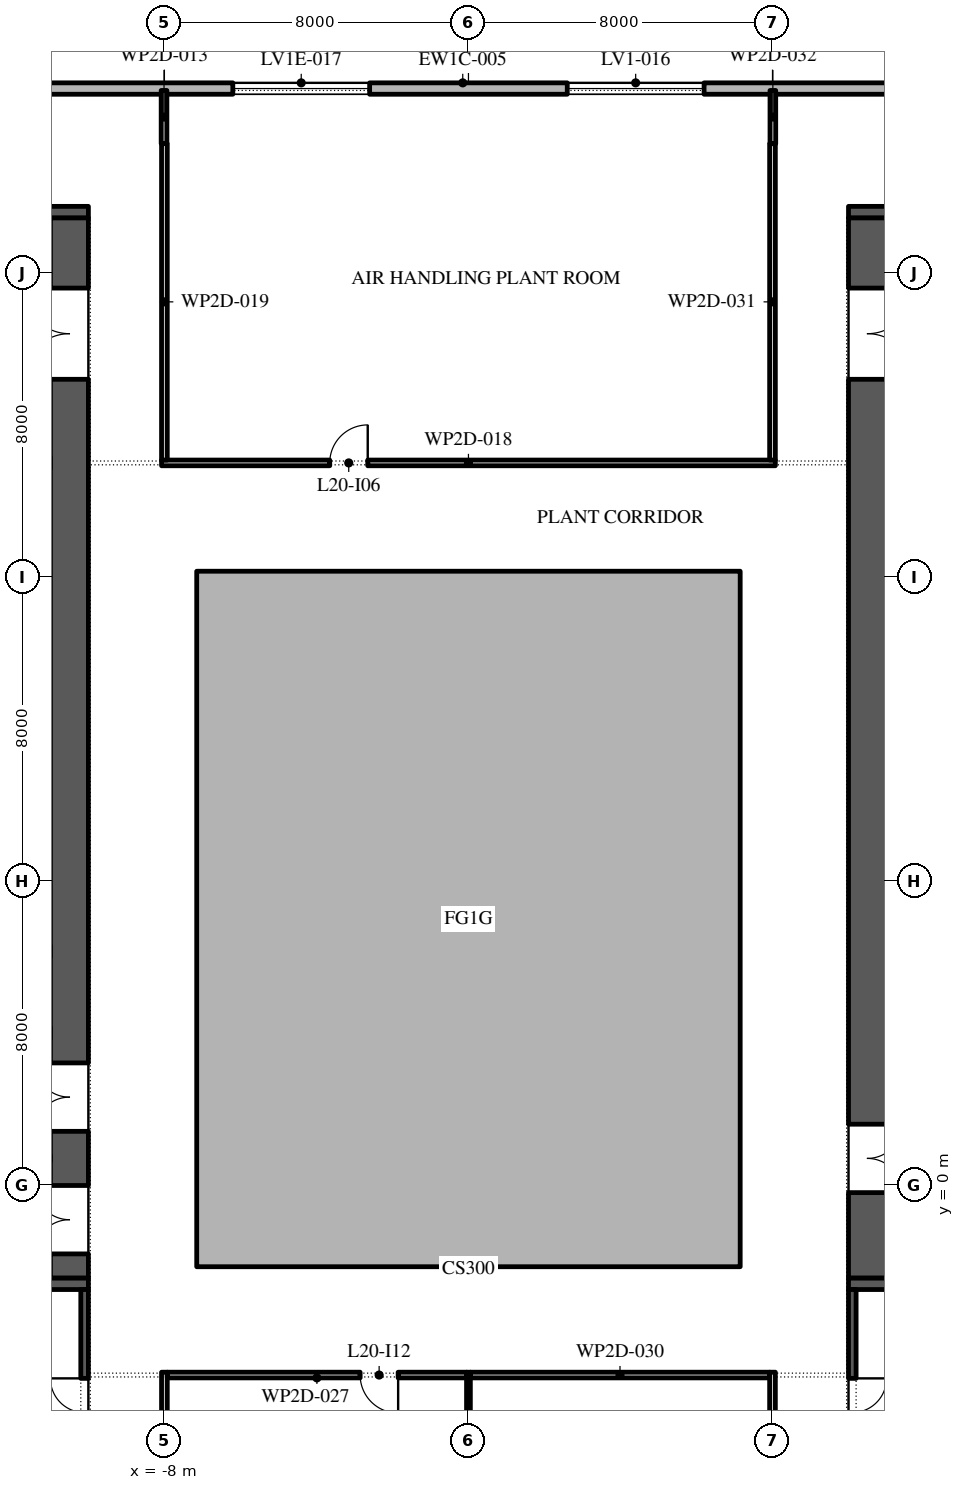
"""IFC4 building model, lengths in metres.
Left out: names, types, materials, properties, quantities, classifications, styles, units other than length and angle.
Written with IfcOpenShell. Run it as: python <this file> out.ifc"""

import sys

from ifc_helpers import new_model, si_unit, direction, frame, frame_2d, origin, place, context, subcontext, project, spatial, polyline, rectangle, outline, extrude, element, fill, save


model = new_model("IFC4")
c1 = context("Model", 3, precision=1e-05, world=origin(), true_north=direction((0.0, 1.0)))
c2 = subcontext(c1, "Body", "Model", "MODEL_VIEW")
j1 = project(units=[si_unit("LENGTHUNIT", "METRE"), si_unit("PLANEANGLEUNIT", "RADIAN")], contexts=[c1])
p1 = place(None, origin())
s1 = spatial("IfcSite", under=j1, at=p1, CompositionType="ELEMENT")
p2 = place(p1, origin())
s2 = spatial("IfcBuilding", under=s1, at=p2, CompositionType="ELEMENT")
p3 = place(p2, frame((0.0, 0.0, 94.2)))
s3 = spatial("IfcBuildingStorey", under=s2, at=p3, CompositionType="ELEMENT", Elevation=94.2)
p4 = place(p3, origin())
e1 = element("IfcWall", 1, at=p4, inside=s3, PredefinedType="STANDARD", context=c2, shape_type="SweptSolid", body=[
    extrude(outline(polyline([(-7.15, -2.15), (7.15, -2.15), (7.15, 16.15), (-7.15, 16.15), (-7.15, -2.15)]), holes=[polyline([(-7.0, -2.0), (-7.0, 16.0), (7.0, 16.0), (7.0, -2.0), (-7.0, -2.0)])]), origin(), (0.0, 0.0, 1.0), 4.95),
])
p5 = place(p3, frame((26.1, 28.85, 0.0), z_axis=(0.0, 0.0, 1.0), x_axis=(-1.0, 0.0, 0.0)))
e2 = element("IfcWall", 2, at=p5, inside=s3, PredefinedType="STANDARD", context=c2, shape_type="SweptSolid", body=[
    extrude(rectangle(XDim=52.5, YDim=0.3, at=frame_2d((26.25, 0.0))), origin(), (0.0, 0.0, 1.0), 4.95),
])
p6 = place(p5, frame((2.45, 0.0, 0.6)))
e3 = element("IfcOpeningElement", 3, at=p6, cuts=e2, PredefinedType="OPENING", context=c2, shape_type="SweptSolid", body=[
    extrude(rectangle(XDim=3.6, YDim=3.9, at=frame_2d((1.8, 1.95))), frame((0.0, 0.16, 0.0), z_axis=(0.0, -1.0, 0.0), x_axis=(1.0, 0.0, 0.0)), (0.0, 0.0, 1.0), 0.32),
])
p7 = place(p5, frame((11.1, 0.0, 0.6)))
e4 = element("IfcOpeningElement", 4, at=p7, cuts=e2, PredefinedType="OPENING", context=c2, shape_type="SweptSolid", body=[
    extrude(rectangle(XDim=3.6, YDim=3.75, at=frame_2d((1.8, 1.875))), frame((0.0, 0.16, 0.0), z_axis=(0.0, -1.0, 0.0), x_axis=(1.0, 0.0, 0.0)), (0.0, 0.0, 1.0), 0.32),
])
p8 = place(p5, frame((19.9, 0.0, 0.6)))
e5 = element("IfcOpeningElement", 5, at=p8, cuts=e2, PredefinedType="OPENING", context=c2, shape_type="SweptSolid", body=[
    extrude(rectangle(XDim=3.6, YDim=3.9, at=frame_2d((1.8, 1.95))), frame((0.0, 0.16, 0.0), z_axis=(0.0, -1.0, 0.0), x_axis=(1.0, 0.0, 0.0)), (0.0, 0.0, 1.0), 0.32),
])
p9 = place(p5, frame((28.7, 0.0, 0.6)))
e6 = element("IfcOpeningElement", 6, at=p9, cuts=e2, PredefinedType="OPENING", context=c2, shape_type="SweptSolid", body=[
    extrude(rectangle(XDim=3.6, YDim=3.55, at=frame_2d((1.8, 1.775))), frame((0.0, 0.16, 0.0), z_axis=(0.0, -1.0, 0.0), x_axis=(1.0, 0.0, 0.0)), (0.0, 0.0, 1.0), 0.32),
])
p10 = place(p5, frame((37.5, 0.0, 0.6)))
e7 = element("IfcOpeningElement", 7, at=p10, cuts=e2, PredefinedType="OPENING", context=c2, shape_type="SweptSolid", body=[
    extrude(rectangle(XDim=3.6, YDim=3.475, at=frame_2d((1.8, 1.738))), frame((0.0, 0.16, 0.0), z_axis=(0.0, -1.0, 0.0), x_axis=(1.0, 0.0, 0.0)), (0.0, 0.0, 1.0), 0.32),
])
p11 = place(p5, frame((46.3, 0.0, 0.6)))
e8 = element("IfcOpeningElement", 8, at=p11, cuts=e2, PredefinedType="OPENING", context=c2, shape_type="SweptSolid", body=[
    extrude(rectangle(XDim=3.6, YDim=3.9, at=frame_2d((1.8, 1.95))), frame((0.0, 0.16, 0.0), z_axis=(0.0, -1.0, 0.0), x_axis=(1.0, 0.0, 0.0)), (0.0, 0.0, 1.0), 0.32),
])
p12 = place(p3, frame((-10.5, -2.45, 0.0), z_axis=(0.0, 0.0, 1.0), x_axis=(0.0, 1.0, 0.0)))
e9 = element("IfcWall", 9, at=p12, inside=s3, PredefinedType="SHEAR", context=c2, shape_type="SweptSolid", body=[
    extrude(rectangle(XDim=27.9, YDim=1.0, at=frame_2d((13.95, 0.0))), origin(), (0.0, 0.0, 1.0), 4.95),
])
p13 = place(p12, frame((23.65, 0.0, 0.0)))
e10 = element("IfcOpeningElement", 10, at=p13, cuts=e9, PredefinedType="OPENING", context=c2, shape_type="SweptSolid", body=[
    extrude(rectangle(XDim=2.4, YDim=2.1, at=frame_2d((1.2, 1.05))), frame((0.0, 0.51, 0.0), z_axis=(0.0, -1.0, 0.0), x_axis=(1.0, 0.0, 0.0)), (0.0, 0.0, 1.0), 1.02),
])
p14 = place(p12, frame((0.637, 0.0, 0.0)))
e11 = element("IfcOpeningElement", 11, at=p14, cuts=e9, PredefinedType="OPENING", context=c2, shape_type="SweptSolid", body=[
    extrude(rectangle(XDim=1.8, YDim=2.4, at=frame_2d((0.9, 1.2))), frame((0.0, 0.51, 0.0), z_axis=(0.0, -1.0, 0.0), x_axis=(1.0, 0.0, 0.0)), (0.0, 0.0, 1.0), 1.02),
])
p15 = place(p12, frame((3.863, 0.0, 0.0)))
e12 = element("IfcOpeningElement", 12, at=p15, cuts=e9, PredefinedType="OPENING", context=c2, shape_type="SweptSolid", body=[
    extrude(rectangle(XDim=1.8, YDim=2.4, at=frame_2d((0.9, 1.2))), frame((0.0, 0.51, 0.0), z_axis=(0.0, -1.0, 0.0), x_axis=(1.0, 0.0, 0.0)), (0.0, 0.0, 1.0), 1.02),
])
for number, where, z_axis, x_axis in (
    (13, (-22.0, -2.6, 0.0), (0.0, 0.0, 1.0), (1.0, 0.0, 0.0)),
    (14, (-22.0, 25.6, 0.0), (0.0, 0.0, 1.0), (1.0, 0.0, 0.0)),
):
    element("IfcWall", number, at=place(p3, frame(where, z_axis=z_axis, x_axis=x_axis)), inside=s3, PredefinedType="SHEAR", context=c2, shape_type="SweptSolid", body=[
        extrude(rectangle(XDim=12.0, YDim=0.3, at=frame_2d((6.0, 0.0))), origin(), (0.0, 0.0, 1.0), 4.95),
    ])
p16 = place(p3, frame((-10.1, -15.8, 0.0), z_axis=(0.0, 0.0, 1.0), x_axis=(0.0, 1.0, 0.0)))
e15 = element("IfcWall", 15, at=p16, inside=s3, PredefinedType="SHEAR", context=c2, shape_type="SweptSolid", body=[
    extrude(rectangle(XDim=13.05, YDim=0.2, at=frame_2d((6.525, 0.0))), origin(), (0.0, 0.0, 1.0), 4.95),
])
p17 = place(p16, frame((2.312, 0.0, 0.0)))
e16 = element("IfcOpeningElement", 16, at=p17, cuts=e15, PredefinedType="OPENING", context=c2, shape_type="SweptSolid", body=[
    extrude(rectangle(XDim=1.8, YDim=2.4, at=frame_2d((0.9, 1.2))), frame((0.0, 0.11, 0.0), z_axis=(0.0, -1.0, 0.0), x_axis=(1.0, 0.0, 0.0)), (0.0, 0.0, 1.0), 0.22),
])
p18 = place(p16, frame((8.913, 0.0, 0.0)))
e17 = element("IfcOpeningElement", 17, at=p18, cuts=e15, PredefinedType="OPENING", context=c2, shape_type="SweptSolid", body=[
    extrude(rectangle(XDim=1.8, YDim=2.4, at=frame_2d((0.9, 1.2))), frame((0.0, 0.11, 0.0), z_axis=(0.0, -1.0, 0.0), x_axis=(1.0, 0.0, 0.0)), (0.0, 0.0, 1.0), 0.22),
])
p19 = place(p3, frame((10.5, -2.45, 0.0), z_axis=(0.0, 0.0, 1.0), x_axis=(0.0, 1.0, 0.0)))
e18 = element("IfcWall", 18, at=p19, inside=s3, PredefinedType="SHEAR", context=c2, shape_type="SweptSolid", body=[
    extrude(rectangle(XDim=27.9, YDim=1.0, at=frame_2d((13.95, 0.0))), origin(), (0.0, 0.0, 1.0), 4.95),
])
p20 = place(p19, frame((23.65, 0.0, 0.0)))
e19 = element("IfcOpeningElement", 19, at=p20, cuts=e18, PredefinedType="OPENING", context=c2, shape_type="SweptSolid", body=[
    extrude(rectangle(XDim=2.4, YDim=2.1, at=frame_2d((1.2, 1.05))), frame((0.0, 0.51, 0.0), z_axis=(0.0, -1.0, 0.0), x_axis=(1.0, 0.0, 0.0)), (0.0, 0.0, 1.0), 1.02),
])
p21 = place(p19, frame((2.25, 0.0, 0.0)))
e20 = element("IfcOpeningElement", 20, at=p21, cuts=e18, PredefinedType="OPENING", context=c2, shape_type="SweptSolid", body=[
    extrude(rectangle(XDim=1.8, YDim=2.4, at=frame_2d((0.9, 1.2))), frame((0.0, 0.51, 0.0), z_axis=(0.0, -1.0, 0.0), x_axis=(1.0, 0.0, 0.0)), (0.0, 0.0, 1.0), 1.02),
])
for number, where, z_axis, x_axis in (
    (21, (10.0, -2.6, 0.0), (0.0, 0.0, 1.0), (1.0, 0.0, 0.0)),
    (22, (10.0, 25.6, 0.0), (0.0, 0.0, 1.0), (1.0, 0.0, 0.0)),
):
    element("IfcWall", number, at=place(p3, frame(where, z_axis=z_axis, x_axis=x_axis)), inside=s3, PredefinedType="SHEAR", context=c2, shape_type="SweptSolid", body=[
        extrude(rectangle(XDim=12.0, YDim=0.3, at=frame_2d((6.0, 0.0))), origin(), (0.0, 0.0, 1.0), 4.95),
    ])
p22 = place(p3, frame((10.1, -15.8, 0.0), z_axis=(0.0, 0.0, 1.0), x_axis=(0.0, 1.0, 0.0)))
e23 = element("IfcWall", 23, at=p22, inside=s3, PredefinedType="SHEAR", context=c2, shape_type="SweptSolid", body=[
    extrude(rectangle(XDim=13.05, YDim=0.2, at=frame_2d((6.525, 0.0))), origin(), (0.0, 0.0, 1.0), 4.95),
])
p23 = place(p22, frame((2.312, 0.0, 0.0)))
e24 = element("IfcOpeningElement", 24, at=p23, cuts=e23, PredefinedType="OPENING", context=c2, shape_type="SweptSolid", body=[
    extrude(rectangle(XDim=1.8, YDim=2.4, at=frame_2d((0.9, 1.2))), frame((0.0, 0.11, 0.0), z_axis=(0.0, -1.0, 0.0), x_axis=(1.0, 0.0, 0.0)), (0.0, 0.0, 1.0), 0.22),
])
p24 = place(p22, frame((8.913, 0.0, 0.0)))
e25 = element("IfcOpeningElement", 25, at=p24, cuts=e23, PredefinedType="OPENING", context=c2, shape_type="SweptSolid", body=[
    extrude(rectangle(XDim=1.8, YDim=2.4, at=frame_2d((0.9, 1.2))), frame((0.0, 0.11, 0.0), z_axis=(0.0, -1.0, 0.0), x_axis=(1.0, 0.0, 0.0)), (0.0, 0.0, 1.0), 0.22),
])
p25 = place(p3, frame((-8.01, 28.8, 0.0), z_axis=(0.0, 0.0, 1.0), x_axis=(0.0, -1.0, 0.0)))
e26 = element("IfcWall", 26, at=p25, inside=s3, PredefinedType="PARTITIONING", context=c2, shape_type="SweptSolid", body=[
    extrude(rectangle(XDim=1.4, YDim=0.15, at=frame_2d((0.7, 0.0))), origin(), (0.0, 0.0, 1.0), 4.95),
])
p26 = place(p3, frame((-8.0, -4.925, 0.0), z_axis=(0.0, 0.0, 1.0), x_axis=(0.0, -1.0, 0.0)))
e27 = element("IfcWall", 27, at=p26, inside=s3, PredefinedType="PARTITIONING", context=c2, shape_type="SweptSolid", body=[
    extrude(rectangle(XDim=5.195, YDim=0.15, at=frame_2d((2.598, 0.0))), origin(), (0.0, 0.0, 1.0), 4.95),
])
p27 = place(p3, frame((-8.075, 19.0, 0.0), z_axis=(0.0, 0.0, 1.0), x_axis=(1.0, 0.0, 0.0)))
e28 = element("IfcWall", 28, at=p27, inside=s3, PredefinedType="PARTITIONING", context=c2, shape_type="SweptSolid", body=[
    extrude(rectangle(XDim=16.15, YDim=0.15, at=frame_2d((8.075, 0.0))), origin(), (0.0, 0.0, 1.0), 4.95),
])
p28 = place(p27, frame((4.425, 0.0, 0.0)))
e29 = element("IfcOpeningElement", 29, at=p28, cuts=e28, PredefinedType="OPENING", context=c2, shape_type="SweptSolid", body=[
    extrude(rectangle(XDim=1.0, YDim=2.1, at=frame_2d((0.5, 1.05))), frame((0.0, 0.085, 0.0), z_axis=(0.0, -1.0, 0.0), x_axis=(1.0, 0.0, 0.0)), (0.0, 0.0, 1.0), 0.17),
])
p29 = place(p3, frame((-8.0, 27.4, 0.0), z_axis=(0.0, 0.0, 1.0), x_axis=(0.0, -1.0, 0.0)))
e30 = element("IfcWall", 30, at=p29, inside=s3, PredefinedType="PARTITIONING", context=c2, shape_type="SweptSolid", body=[
    extrude(rectangle(XDim=8.325, YDim=0.15, at=frame_2d((4.163, 0.0))), origin(), (0.0, 0.0, 1.0), 4.95),
])
p30 = place(p3, frame((0.0, -10.12, 0.0), z_axis=(0.0, 0.0, 1.0), x_axis=(0.0, 1.0, 0.0)))
e31 = element("IfcWall", 31, at=p30, inside=s3, PredefinedType="PARTITIONING", context=c2, shape_type="SweptSolid", body=[
    extrude(rectangle(XDim=5.195, YDim=0.1, at=frame_2d((2.598, 0.0))), origin(), (0.0, 0.0, 1.0), 3.97),
])
p31 = place(p3, frame((-0.05, -5.0, 0.0), z_axis=(0.0, 0.0, 1.0), x_axis=(-1.0, 0.0, 0.0)))
e32 = element("IfcWall", 32, at=p31, inside=s3, PredefinedType="PARTITIONING", context=c2, shape_type="SweptSolid", body=[
    extrude(rectangle(XDim=7.875, YDim=0.15, at=frame_2d((3.938, 0.0))), origin(), (0.0, 0.0, 1.0), 4.95),
])
p32 = place(p31, frame((1.8, 0.0, 0.0)))
e33 = element("IfcOpeningElement", 33, at=p32, cuts=e32, PredefinedType="OPENING", context=c2, shape_type="SweptSolid", body=[
    extrude(rectangle(XDim=1.0, YDim=2.1, at=frame_2d((0.5, 1.05))), frame((0.0, 0.085, 0.0), z_axis=(0.0, -1.0, 0.0), x_axis=(1.0, 0.0, 0.0)), (0.0, 0.0, 1.0), 0.17),
])
p33 = place(p3, frame((8.0, -16.45, 0.0), z_axis=(0.0, 0.0, 1.0), x_axis=(0.0, 1.0, 0.0)))
e34 = element("IfcWall", 34, at=p33, inside=s3, PredefinedType="PARTITIONING", context=c2, shape_type="SweptSolid", body=[
    extrude(rectangle(XDim=11.525, YDim=0.15, at=frame_2d((5.762, 0.0))), origin(), (0.0, 0.0, 1.0), 4.95),
])
p34 = place(p33, frame((2.8, 0.0, 0.0)))
e35 = element("IfcOpeningElement", 35, at=p34, cuts=e34, PredefinedType="OPENING", context=c2, shape_type="SweptSolid", body=[
    extrude(rectangle(XDim=1.0, YDim=2.1, at=frame_2d((0.5, 1.05))), frame((0.0, 0.085, 0.0), z_axis=(0.0, -1.0, 0.0), x_axis=(1.0, 0.0, 0.0)), (0.0, 0.0, 1.0), 0.17),
])
p35 = place(p3, frame((7.925, -5.0, 0.0), z_axis=(0.0, 0.0, 1.0), x_axis=(-1.0, 0.0, 0.0)))
e36 = element("IfcWall", 36, at=p35, inside=s3, PredefinedType="PARTITIONING", context=c2, shape_type="SweptSolid", body=[
    extrude(rectangle(XDim=7.875, YDim=0.15, at=frame_2d((3.938, 0.0))), origin(), (0.0, 0.0, 1.0), 4.95),
])
p36 = place(p3, frame((8.0, 19.075, 0.0), z_axis=(0.0, 0.0, 1.0), x_axis=(0.0, 1.0, 0.0)))
e37 = element("IfcWall", 37, at=p36, inside=s3, PredefinedType="PARTITIONING", context=c2, shape_type="SweptSolid", body=[
    extrude(rectangle(XDim=8.325, YDim=0.15, at=frame_2d((4.163, 0.0))), origin(), (0.0, 0.0, 1.0), 4.95),
])
p37 = place(p3, frame((8.01, 27.4, 0.0), z_axis=(0.0, 0.0, 1.0), x_axis=(0.0, 1.0, 0.0)))
e38 = element("IfcWall", 38, at=p37, inside=s3, PredefinedType="PARTITIONING", context=c2, shape_type="SweptSolid", body=[
    extrude(rectangle(XDim=1.4, YDim=0.15, at=frame_2d((0.7, 0.0))), origin(), (0.0, 0.0, 1.0), 4.95),
])
p38 = place(p8, origin())
e39 = element("IfcWindow", 39, at=p38, inside=s3, PartitioningType="DOUBLE_PANEL_HORIZONTAL", PredefinedType="WINDOW", context=c2, shape_type="SweptSolid", body=[
    extrude(rectangle(XDim=3.6, YDim=3.9, at=frame_2d((1.8, 1.95))), frame((0.0, 0.03, 0.0), z_axis=(0.0, -1.0, 0.0), x_axis=(1.0, 0.0, 0.0)), (0.0, 0.0, 1.0), 0.06),
])
fill(e5, e39)
p39 = place(p9, origin())
e40 = element("IfcWindow", 40, at=p39, inside=s3, PartitioningType="DOUBLE_PANEL_HORIZONTAL", PredefinedType="WINDOW", context=c2, shape_type="SweptSolid", body=[
    extrude(rectangle(XDim=3.6, YDim=3.55, at=frame_2d((1.8, 1.775))), frame((0.0, 0.03, 0.0), z_axis=(0.0, -1.0, 0.0), x_axis=(1.0, 0.0, 0.0)), (0.0, 0.0, 1.0), 0.06),
])
fill(e6, e40)
p40 = place(p13, origin())
e41 = element("IfcDoor", 41, at=p40, inside=s3, OperationType="DOUBLE_DOOR_SINGLE_SWING", PredefinedType="DOOR", context=c2, shape_type="SweptSolid", body=[
    extrude(rectangle(XDim=2.4, YDim=2.1, at=frame_2d((1.2, 1.05))), frame((0.0, 0.025, 0.0), z_axis=(0.0, -1.0, 0.0), x_axis=(1.0, 0.0, 0.0)), (0.0, 0.0, 1.0), 0.05),
])
fill(e10, e41)
p41 = place(p18, origin())
e42 = element("IfcDoor", 42, at=p41, inside=s3, OperationType="DOUBLE_DOOR_SINGLE_SWING", PredefinedType="DOOR", context=c2, shape_type="SweptSolid", body=[
    extrude(rectangle(XDim=1.8, YDim=2.4, at=frame_2d((0.9, 1.2))), frame((0.0, 0.1, 0.0), z_axis=(0.0, -1.0, 0.0), x_axis=(1.0, 0.0, 0.0)), (0.0, 0.0, 1.0), 0.05),
])
fill(e17, e42)
p42 = place(p20, frame((2.4, 0.0, 0.0), z_axis=(0.0, 0.0, 1.0), x_axis=(-1.0, 0.0, 0.0)))
e43 = element("IfcDoor", 43, at=p42, inside=s3, OperationType="DOUBLE_DOOR_SINGLE_SWING", PredefinedType="DOOR", context=c2, shape_type="SweptSolid", body=[
    extrude(rectangle(XDim=2.4, YDim=2.1, at=frame_2d((1.2, 1.05))), frame((0.0, 0.025, 0.0), z_axis=(0.0, -1.0, 0.0), x_axis=(1.0, 0.0, 0.0)), (0.0, 0.0, 1.0), 0.05),
])
fill(e19, e43)
p43 = place(p24, frame((1.8, -0.15, 0.0), z_axis=(0.0, 0.0, 1.0), x_axis=(-1.0, 0.0, 0.0)))
e44 = element("IfcDoor", 44, at=p43, inside=s3, OperationType="DOUBLE_DOOR_SINGLE_SWING", PredefinedType="DOOR", context=c2, shape_type="SweptSolid", body=[
    extrude(rectangle(XDim=1.8, YDim=2.4, at=frame_2d((0.9, 1.2))), frame((0.0, -0.05, 0.0), z_axis=(0.0, -1.0, 0.0), x_axis=(1.0, 0.0, 0.0)), (0.0, 0.0, 1.0), 0.05),
])
fill(e25, e44)
p44 = place(p28, origin())
e45 = element("IfcDoor", 45, at=p44, inside=s3, OperationType="SINGLE_SWING_LEFT", PredefinedType="DOOR", context=c2, shape_type="SweptSolid", body=[
    extrude(rectangle(XDim=1.0, YDim=2.1, at=frame_2d((0.5, 1.05))), frame((0.0, 0.025, 0.0), z_axis=(0.0, -1.0, 0.0), x_axis=(1.0, 0.0, 0.0)), (0.0, 0.0, 1.0), 0.05),
])
fill(e29, e45)
p45 = place(p32, origin())
e46 = element("IfcDoor", 46, at=p45, inside=s3, OperationType="SINGLE_SWING_RIGHT", PredefinedType="DOOR", context=c2, shape_type="SweptSolid", body=[
    extrude(rectangle(XDim=1.0, YDim=2.1, at=frame_2d((0.5, 1.05))), frame((0.0, 0.025, 0.0), z_axis=(0.0, -1.0, 0.0), x_axis=(1.0, 0.0, 0.0)), (0.0, 0.0, 1.0), 0.05),
])
fill(e33, e46)
save(model, sys.argv[1])
